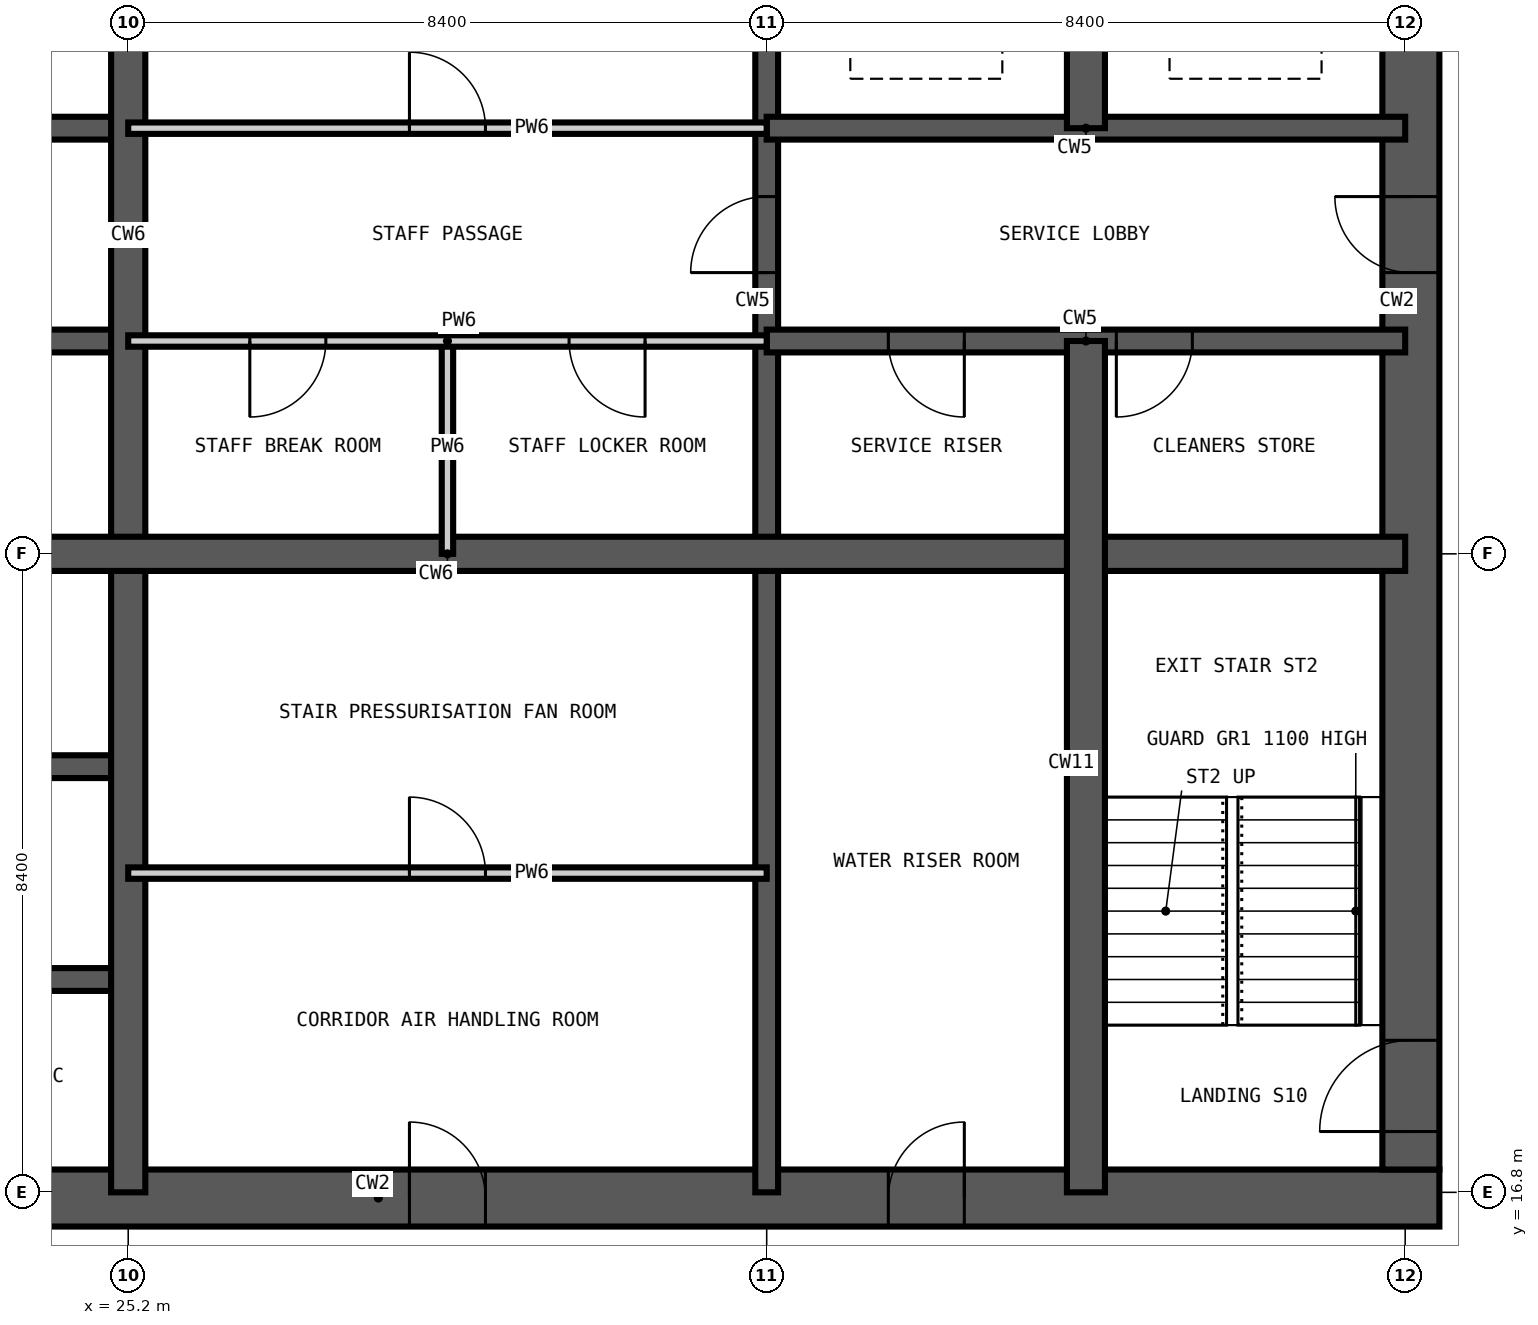
"""IFC4 building model, lengths in metres.
Left out: names, types, materials, properties, quantities, classifications, styles, units other than length and angle.
Written with IfcOpenShell. Run it as: python <this file> out.ifc"""

import sys

from ifc_helpers import new_model, si_unit, direction, frame, frame_2d, origin, place, context, subcontext, project, spatial, rectangle, extrude, element, fill, save


model = new_model("IFC4")
c1 = context("Model", 3, precision=1e-05, world=origin(), true_north=direction((0.0, 1.0)))
c2 = subcontext(c1, "Body", "Model", "MODEL_VIEW")
j1 = project(units=[si_unit("LENGTHUNIT", "METRE"), si_unit("PLANEANGLEUNIT", "RADIAN")], contexts=[c1])
p1 = place(None, origin())
s1 = spatial("IfcSite", under=j1, at=p1, CompositionType="ELEMENT")
p2 = place(p1, origin())
s2 = spatial("IfcBuilding", under=s1, at=p2, CompositionType="ELEMENT")
p3 = place(p2, frame((0.0, 0.0, 177.0)))
s3 = spatial("IfcBuildingStorey", under=s2, at=p3, CompositionType="ELEMENT", Elevation=177.0)
p4 = place(p3, frame((16.35, 16.725, -0.35), z_axis=(0.0, 0.0, 1.0), x_axis=(1.0, 0.0, 0.0)))
e1 = element("IfcWall", 1, at=p4, inside=s3, PredefinedType="SHEAR", context=c2, shape_type="SweptSolid", body=[
    extrude(rectangle(XDim=26.1, YDim=0.75, at=frame_2d((13.05, 0.0))), origin(), (0.0, 0.0, 1.0), 3.6),
])
p5 = place(p4, frame((12.55, 0.0, 0.35)))
e2 = element("IfcOpeningElement", 2, at=p5, cuts=e1, PredefinedType="OPENING", context=c2, shape_type="SweptSolid", body=[
    extrude(rectangle(XDim=1.0, YDim=2.1, at=frame_2d((0.5, 1.05))), frame((0.0, 0.385, 0.0), z_axis=(0.0, -1.0, 0.0), x_axis=(1.0, 0.0, 0.0)), (0.0, 0.0, 1.0), 0.77),
])
p6 = place(p4, frame((18.85, 0.0, 0.35)))
e3 = element("IfcOpeningElement", 3, at=p6, cuts=e1, PredefinedType="OPENING", context=c2, shape_type="SweptSolid", body=[
    extrude(rectangle(XDim=1.0, YDim=2.1, at=frame_2d((0.5, 1.05))), frame((0.0, 0.385, 0.0), z_axis=(0.0, -1.0, 0.0), x_axis=(1.0, 0.0, 0.0)), (0.0, 0.0, 1.0), 0.77),
])
p7 = place(p3, frame((42.075, 17.1, -0.35), z_axis=(0.0, 0.0, 1.0), x_axis=(0.0, 1.0, 0.0)))
e4 = element("IfcWall", 4, at=p7, inside=s3, PredefinedType="SHEAR", context=c2, shape_type="SweptSolid", body=[
    extrude(rectangle(XDim=24.6, YDim=0.75, at=frame_2d((12.3, 0.0))), origin(), (0.0, 0.0, 1.0), 3.6),
])
p8 = place(p7, frame((0.5, 0.0, 0.35)))
e5 = element("IfcOpeningElement", 5, at=p8, cuts=e4, PredefinedType="OPENING", context=c2, shape_type="SweptSolid", body=[
    extrude(rectangle(XDim=1.2, YDim=2.2, at=frame_2d((0.6, 1.1))), frame((0.0, 0.385, 0.0), z_axis=(0.0, -1.0, 0.0), x_axis=(1.0, 0.0, 0.0)), (0.0, 0.0, 1.0), 0.77),
])
p9 = place(p7, frame((11.8, 0.0, 0.35)))
e6 = element("IfcOpeningElement", 6, at=p9, cuts=e4, PredefinedType="OPENING", context=c2, shape_type="SweptSolid", body=[
    extrude(rectangle(XDim=1.0, YDim=2.1, at=frame_2d((0.5, 1.05))), frame((0.0, 0.385, 0.0), z_axis=(0.0, -1.0, 0.0), x_axis=(1.0, 0.0, 0.0)), (0.0, 0.0, 1.0), 0.77),
])
p10 = place(p7, frame((20.2, 0.0, 0.35)))
e7 = element("IfcOpeningElement", 7, at=p10, cuts=e4, PredefinedType="OPENING", context=c2, shape_type="SweptSolid", body=[
    extrude(rectangle(XDim=1.0, YDim=2.1, at=frame_2d((0.5, 1.05))), frame((0.0, 0.385, 0.0), z_axis=(0.0, -1.0, 0.0), x_axis=(1.0, 0.0, 0.0)), (0.0, 0.0, 1.0), 0.77),
])
p11 = place(p3, frame((33.6, 16.8, -0.35), z_axis=(0.0, 0.0, 1.0), x_axis=(0.0, 1.0, 0.0)))
e8 = element("IfcWall", 8, at=p11, inside=s3, PredefinedType="SHEAR", context=c2, shape_type="SweptSolid", body=[
    extrude(rectangle(XDim=25.2, YDim=0.3, at=frame_2d((12.6, 0.0))), origin(), (0.0, 0.0, 1.0), 3.6),
])
p12 = place(p11, frame((22.5, 0.0, 0.35)))
e9 = element("IfcOpeningElement", 9, at=p12, cuts=e8, PredefinedType="OPENING", context=c2, shape_type="SweptSolid", body=[
    extrude(rectangle(XDim=1.2, YDim=2.2, at=frame_2d((0.6, 1.1))), frame((0.0, 0.16, 0.0), z_axis=(0.0, -1.0, 0.0), x_axis=(1.0, 0.0, 0.0)), (0.0, 0.0, 1.0), 0.32),
])
p13 = place(p11, frame((18.3, 0.0, 0.35)))
e10 = element("IfcOpeningElement", 10, at=p13, cuts=e8, PredefinedType="OPENING", context=c2, shape_type="SweptSolid", body=[
    extrude(rectangle(XDim=1.2, YDim=2.2, at=frame_2d((0.6, 1.1))), frame((0.0, 0.16, 0.0), z_axis=(0.0, -1.0, 0.0), x_axis=(1.0, 0.0, 0.0)), (0.0, 0.0, 1.0), 0.32),
])
p14 = place(p11, frame((12.1, 0.0, 0.35)))
e11 = element("IfcOpeningElement", 11, at=p14, cuts=e8, PredefinedType="OPENING", context=c2, shape_type="SweptSolid", body=[
    extrude(rectangle(XDim=1.0, YDim=2.1, at=frame_2d((0.5, 1.05))), frame((0.0, 0.16, 0.0), z_axis=(0.0, -1.0, 0.0), x_axis=(1.0, 0.0, 0.0)), (0.0, 0.0, 1.0), 0.32),
])
p15 = place(p3, frame((16.8, 19.6, -0.35), z_axis=(0.0, 0.0, 1.0), x_axis=(1.0, 0.0, 0.0)))
e12 = element("IfcWall", 12, at=p15, inside=s3, PredefinedType="SHEAR", context=c2, shape_type="SweptSolid", body=[
    extrude(rectangle(XDim=8.4, YDim=0.3, at=frame_2d((4.2, 0.0))), origin(), (0.0, 0.0, 1.0), 3.6),
])
p16 = place(p15, frame((1.6, 0.0, 0.35)))
e13 = element("IfcOpeningElement", 13, at=p16, cuts=e12, PredefinedType="OPENING", context=c2, shape_type="SweptSolid", body=[
    extrude(rectangle(XDim=1.0, YDim=2.1, at=frame_2d((0.5, 1.05))), frame((0.0, 0.16, 0.0), z_axis=(0.0, -1.0, 0.0), x_axis=(1.0, 0.0, 0.0)), (0.0, 0.0, 1.0), 0.32),
])
p17 = place(p15, frame((5.8, 0.0, 0.35)))
e14 = element("IfcOpeningElement", 14, at=p17, cuts=e12, PredefinedType="OPENING", context=c2, shape_type="SweptSolid", body=[
    extrude(rectangle(XDim=1.0, YDim=2.1, at=frame_2d((0.5, 1.05))), frame((0.0, 0.16, 0.0), z_axis=(0.0, -1.0, 0.0), x_axis=(1.0, 0.0, 0.0)), (0.0, 0.0, 1.0), 0.32),
])
p18 = place(p3, frame((16.8, 22.4, -0.35), z_axis=(0.0, 0.0, 1.0), x_axis=(1.0, 0.0, 0.0)))
e15 = element("IfcWall", 15, at=p18, inside=s3, PredefinedType="SHEAR", context=c2, shape_type="SweptSolid", body=[
    extrude(rectangle(XDim=8.4, YDim=0.3, at=frame_2d((4.2, 0.0))), origin(), (0.0, 0.0, 1.0), 3.6),
])
p19 = place(p18, frame((1.6, 0.0, 0.35)))
e16 = element("IfcOpeningElement", 16, at=p19, cuts=e15, PredefinedType="OPENING", context=c2, shape_type="SweptSolid", body=[
    extrude(rectangle(XDim=1.0, YDim=2.1, at=frame_2d((0.5, 1.05))), frame((0.0, 0.16, 0.0), z_axis=(0.0, -1.0, 0.0), x_axis=(1.0, 0.0, 0.0)), (0.0, 0.0, 1.0), 0.32),
])
p20 = place(p18, frame((5.8, 0.0, 0.35)))
e17 = element("IfcOpeningElement", 17, at=p20, cuts=e15, PredefinedType="OPENING", context=c2, shape_type="SweptSolid", body=[
    extrude(rectangle(XDim=1.0, YDim=2.1, at=frame_2d((0.5, 1.05))), frame((0.0, 0.16, 0.0), z_axis=(0.0, -1.0, 0.0), x_axis=(1.0, 0.0, 0.0)), (0.0, 0.0, 1.0), 0.32),
])
p21 = place(p3, frame((16.8, 28.0, -0.35), z_axis=(0.0, 0.0, 1.0), x_axis=(1.0, 0.0, 0.0)))
e18 = element("IfcWall", 18, at=p21, inside=s3, PredefinedType="SHEAR", context=c2, shape_type="SweptSolid", body=[
    extrude(rectangle(XDim=8.4, YDim=0.3, at=frame_2d((4.2, 0.0))), origin(), (0.0, 0.0, 1.0), 3.6),
])
p22 = place(p21, frame((1.55, 0.0, 0.35)))
e19 = element("IfcOpeningElement", 19, at=p22, cuts=e18, PredefinedType="OPENING", context=c2, shape_type="SweptSolid", body=[
    extrude(rectangle(XDim=1.1, YDim=2.2, at=frame_2d((0.55, 1.1))), frame((0.0, 0.16, 0.0), z_axis=(0.0, -1.0, 0.0), x_axis=(1.0, 0.0, 0.0)), (0.0, 0.0, 1.0), 0.32),
])
p23 = place(p21, frame((5.75, 0.0, 0.35)))
e20 = element("IfcOpeningElement", 20, at=p23, cuts=e18, PredefinedType="OPENING", context=c2, shape_type="SweptSolid", body=[
    extrude(rectangle(XDim=1.1, YDim=2.2, at=frame_2d((0.55, 1.1))), frame((0.0, 0.16, 0.0), z_axis=(0.0, -1.0, 0.0), x_axis=(1.0, 0.0, 0.0)), (0.0, 0.0, 1.0), 0.32),
])
p24 = place(p3, frame((33.6, 28.0, -0.35), z_axis=(0.0, 0.0, 1.0), x_axis=(1.0, 0.0, 0.0)))
e21 = element("IfcWall", 21, at=p24, inside=s3, PredefinedType="SHEAR", context=c2, shape_type="SweptSolid", body=[
    extrude(rectangle(XDim=8.4, YDim=0.3, at=frame_2d((4.2, 0.0))), origin(), (0.0, 0.0, 1.0), 3.6),
])
p25 = place(p24, frame((1.6, 0.0, 0.35)))
e22 = element("IfcOpeningElement", 22, at=p25, cuts=e21, PredefinedType="OPENING", context=c2, shape_type="SweptSolid", body=[
    extrude(rectangle(XDim=1.0, YDim=2.1, at=frame_2d((0.5, 1.05))), frame((0.0, 0.16, 0.0), z_axis=(0.0, -1.0, 0.0), x_axis=(1.0, 0.0, 0.0)), (0.0, 0.0, 1.0), 0.32),
])
p26 = place(p24, frame((4.6, 0.0, 0.35)))
e23 = element("IfcOpeningElement", 23, at=p26, cuts=e21, PredefinedType="OPENING", context=c2, shape_type="SweptSolid", body=[
    extrude(rectangle(XDim=1.0, YDim=2.1, at=frame_2d((0.5, 1.05))), frame((0.0, 0.16, 0.0), z_axis=(0.0, -1.0, 0.0), x_axis=(1.0, 0.0, 0.0)), (0.0, 0.0, 1.0), 0.32),
])
p27 = place(p3, frame((16.8, 30.8, -0.35), z_axis=(0.0, 0.0, 1.0), x_axis=(1.0, 0.0, 0.0)))
e24 = element("IfcWall", 24, at=p27, inside=s3, PredefinedType="SHEAR", context=c2, shape_type="SweptSolid", body=[
    extrude(rectangle(XDim=8.4, YDim=0.3, at=frame_2d((4.2, 0.0))), origin(), (0.0, 0.0, 1.0), 3.6),
])
p28 = place(p27, frame((1.55, 0.0, 0.35)))
e25 = element("IfcOpeningElement", 25, at=p28, cuts=e24, PredefinedType="OPENING", context=c2, shape_type="SweptSolid", body=[
    extrude(rectangle(XDim=1.1, YDim=2.2, at=frame_2d((0.55, 1.1))), frame((0.0, 0.16, 0.0), z_axis=(0.0, -1.0, 0.0), x_axis=(1.0, 0.0, 0.0)), (0.0, 0.0, 1.0), 0.32),
])
p29 = place(p27, frame((5.75, 0.0, 0.35)))
e26 = element("IfcOpeningElement", 26, at=p29, cuts=e24, PredefinedType="OPENING", context=c2, shape_type="SweptSolid", body=[
    extrude(rectangle(XDim=1.1, YDim=2.2, at=frame_2d((0.55, 1.1))), frame((0.0, 0.16, 0.0), z_axis=(0.0, -1.0, 0.0), x_axis=(1.0, 0.0, 0.0)), (0.0, 0.0, 1.0), 0.32),
])
p30 = place(p3, frame((33.6, 30.8, -0.35), z_axis=(0.0, 0.0, 1.0), x_axis=(1.0, 0.0, 0.0)))
e27 = element("IfcWall", 27, at=p30, inside=s3, PredefinedType="SHEAR", context=c2, shape_type="SweptSolid", body=[
    extrude(rectangle(XDim=8.4, YDim=0.3, at=frame_2d((4.2, 0.0))), origin(), (0.0, 0.0, 1.0), 3.6),
])
for number, where, z_axis, x_axis in (
    (28, (25.2, 16.8, -0.35), (0.0, 0.0, 1.0), (0.0, 1.0, 0.0)),
    (29, (16.8, 25.2, -0.35), (0.0, 0.0, 1.0), (1.0, 0.0, 0.0)),
):
    element("IfcWall", number, at=place(p3, frame(where, z_axis=z_axis, x_axis=x_axis)), inside=s3, PredefinedType="SHEAR", context=c2, shape_type="SweptSolid", body=[
        extrude(rectangle(XDim=25.2, YDim=0.45, at=frame_2d((12.6, 0.0))), origin(), (0.0, 0.0, 1.0), 3.6),
    ])
p31 = place(p3, frame((37.8, 16.8, -0.35), z_axis=(0.0, 0.0, 1.0), x_axis=(0.0, 1.0, 0.0)))
e30 = element("IfcWall", 30, at=p31, inside=s3, PredefinedType="SHEAR", context=c2, shape_type="SweptSolid", body=[
    extrude(rectangle(XDim=11.2, YDim=0.5, at=frame_2d((5.6, 0.0))), origin(), (0.0, 0.0, 1.0), 3.6),
])
p32 = place(p3, frame((37.8, 30.8, -0.35), z_axis=(0.0, 0.0, 1.0), x_axis=(0.0, 1.0, 0.0)))
e31 = element("IfcWall", 31, at=p32, inside=s3, PredefinedType="SHEAR", context=c2, shape_type="SweptSolid", body=[
    extrude(rectangle(XDim=2.8, YDim=0.5, at=frame_2d((1.4, 0.0))), origin(), (0.0, 0.0, 1.0), 3.6),
])
p33 = place(p3, frame((29.4, 25.2, 0.0), z_axis=(0.0, 0.0, 1.0), x_axis=(0.0, 1.0, 0.0)))
e32 = element("IfcWall", 32, at=p33, inside=s3, PredefinedType="PARTITIONING", context=c2, shape_type="SweptSolid", body=[
    extrude(rectangle(XDim=2.8, YDim=0.15, at=frame_2d((1.4, 0.0))), origin(), (0.0, 0.0, 1.0), 3.25),
])
p34 = place(p3, frame((25.2, 21.0, 0.0), z_axis=(0.0, 0.0, 1.0), x_axis=(1.0, 0.0, 0.0)))
e33 = element("IfcWall", 33, at=p34, inside=s3, PredefinedType="PARTITIONING", context=c2, shape_type="SweptSolid", body=[
    extrude(rectangle(XDim=8.4, YDim=0.15, at=frame_2d((4.2, 0.0))), origin(), (0.0, 0.0, 1.0), 3.25),
])
p35 = place(p34, frame((3.7, 0.0, 0.0)))
e34 = element("IfcOpeningElement", 34, at=p35, cuts=e33, PredefinedType="OPENING", context=c2, shape_type="SweptSolid", body=[
    extrude(rectangle(XDim=1.0, YDim=2.1, at=frame_2d((0.5, 1.05))), frame((0.0, 0.085, 0.0), z_axis=(0.0, -1.0, 0.0), x_axis=(1.0, 0.0, 0.0)), (0.0, 0.0, 1.0), 0.17),
])
p36 = place(p3, frame((25.2, 28.0, 0.0), z_axis=(0.0, 0.0, 1.0), x_axis=(1.0, 0.0, 0.0)))
e35 = element("IfcWall", 35, at=p36, inside=s3, PredefinedType="PARTITIONING", context=c2, shape_type="SweptSolid", body=[
    extrude(rectangle(XDim=8.4, YDim=0.15, at=frame_2d((4.2, 0.0))), origin(), (0.0, 0.0, 1.0), 3.25),
])
p37 = place(p36, frame((5.8, 0.0, 0.0)))
e36 = element("IfcOpeningElement", 36, at=p37, cuts=e35, PredefinedType="OPENING", context=c2, shape_type="SweptSolid", body=[
    extrude(rectangle(XDim=1.0, YDim=2.1, at=frame_2d((0.5, 1.05))), frame((0.0, 0.085, 0.0), z_axis=(0.0, -1.0, 0.0), x_axis=(1.0, 0.0, 0.0)), (0.0, 0.0, 1.0), 0.17),
])
p38 = place(p36, frame((1.6, 0.0, 0.0)))
e37 = element("IfcOpeningElement", 37, at=p38, cuts=e35, PredefinedType="OPENING", context=c2, shape_type="SweptSolid", body=[
    extrude(rectangle(XDim=1.0, YDim=2.1, at=frame_2d((0.5, 1.05))), frame((0.0, 0.085, 0.0), z_axis=(0.0, -1.0, 0.0), x_axis=(1.0, 0.0, 0.0)), (0.0, 0.0, 1.0), 0.17),
])
p39 = place(p3, frame((25.2, 30.8, 0.0), z_axis=(0.0, 0.0, 1.0), x_axis=(1.0, 0.0, 0.0)))
e38 = element("IfcWall", 38, at=p39, inside=s3, PredefinedType="PARTITIONING", context=c2, shape_type="SweptSolid", body=[
    extrude(rectangle(XDim=8.4, YDim=0.15, at=frame_2d((4.2, 0.0))), origin(), (0.0, 0.0, 1.0), 3.25),
])
p40 = place(p39, frame((3.7, 0.0, 0.0)))
e39 = element("IfcOpeningElement", 39, at=p40, cuts=e38, PredefinedType="OPENING", context=c2, shape_type="SweptSolid", body=[
    extrude(rectangle(XDim=1.0, YDim=2.1, at=frame_2d((0.5, 1.05))), frame((0.0, 0.085, 0.0), z_axis=(0.0, -1.0, 0.0), x_axis=(1.0, 0.0, 0.0)), (0.0, 0.0, 1.0), 0.17),
])
p41 = place(p8, origin())
e40 = element("IfcDoor", 40, at=p41, inside=s3, OperationType="SINGLE_SWING_LEFT", PredefinedType="DOOR", context=c2, shape_type="SweptSolid", body=[
    extrude(rectangle(XDim=1.2, YDim=2.2, at=frame_2d((0.6, 1.1))), frame((0.0, 0.025, 0.0), z_axis=(0.0, -1.0, 0.0), x_axis=(1.0, 0.0, 0.0)), (0.0, 0.0, 1.0), 0.05),
])
fill(e5, e40)
p42 = place(p14, origin())
e41 = element("IfcDoor", 41, at=p42, inside=s3, OperationType="SINGLE_SWING_LEFT", PredefinedType="DOOR", context=c2, shape_type="SweptSolid", body=[
    extrude(rectangle(XDim=1.0, YDim=2.1, at=frame_2d((0.5, 1.05))), frame((0.0, 0.025, 0.0), z_axis=(0.0, -1.0, 0.0), x_axis=(1.0, 0.0, 0.0)), (0.0, 0.0, 1.0), 0.05),
])
fill(e11, e41)
p43 = place(p37, frame((1.0, 0.0, 0.0), z_axis=(0.0, 0.0, 1.0), x_axis=(-1.0, 0.0, 0.0)))
e42 = element("IfcDoor", 42, at=p43, inside=s3, OperationType="SINGLE_SWING_LEFT", PredefinedType="DOOR", context=c2, shape_type="SweptSolid", body=[
    extrude(rectangle(XDim=1.0, YDim=2.1, at=frame_2d((0.5, 1.05))), frame((0.0, 0.025, 0.0), z_axis=(0.0, -1.0, 0.0), x_axis=(1.0, 0.0, 0.0)), (0.0, 0.0, 1.0), 0.05),
])
fill(e36, e42)
p44 = place(p38, frame((1.0, 0.0, 0.0), z_axis=(0.0, 0.0, 1.0), x_axis=(-1.0, 0.0, 0.0)))
e43 = element("IfcDoor", 43, at=p44, inside=s3, OperationType="SINGLE_SWING_RIGHT", PredefinedType="DOOR", context=c2, shape_type="SweptSolid", body=[
    extrude(rectangle(XDim=1.0, YDim=2.1, at=frame_2d((0.5, 1.05))), frame((0.0, 0.025, 0.0), z_axis=(0.0, -1.0, 0.0), x_axis=(1.0, 0.0, 0.0)), (0.0, 0.0, 1.0), 0.05),
])
fill(e37, e43)
p45 = place(p40, origin())
e44 = element("IfcDoor", 44, at=p45, inside=s3, OperationType="SINGLE_SWING_LEFT", PredefinedType="DOOR", context=c2, shape_type="SweptSolid", body=[
    extrude(rectangle(XDim=1.0, YDim=2.1, at=frame_2d((0.5, 1.05))), frame((0.0, 0.025, 0.0), z_axis=(0.0, -1.0, 0.0), x_axis=(1.0, 0.0, 0.0)), (0.0, 0.0, 1.0), 0.05),
])
fill(e39, e44)
p46 = place(p25, frame((1.0, 0.0, 0.0), z_axis=(0.0, 0.0, 1.0), x_axis=(-1.0, 0.0, 0.0)))
e45 = element("IfcDoor", 45, at=p46, inside=s3, OperationType="SINGLE_SWING_LEFT", PredefinedType="DOOR", context=c2, shape_type="SweptSolid", body=[
    extrude(rectangle(XDim=1.0, YDim=2.1, at=frame_2d((0.5, 1.05))), frame((0.0, 0.025, 0.0), z_axis=(0.0, -1.0, 0.0), x_axis=(1.0, 0.0, 0.0)), (0.0, 0.0, 1.0), 0.05),
])
fill(e22, e45)
p47 = place(p26, frame((1.0, 0.0, 0.0), z_axis=(0.0, 0.0, 1.0), x_axis=(-1.0, 0.0, 0.0)))
e46 = element("IfcDoor", 46, at=p47, inside=s3, OperationType="SINGLE_SWING_RIGHT", PredefinedType="DOOR", context=c2, shape_type="SweptSolid", body=[
    extrude(rectangle(XDim=1.0, YDim=2.1, at=frame_2d((0.5, 1.05))), frame((0.0, 0.025, 0.0), z_axis=(0.0, -1.0, 0.0), x_axis=(1.0, 0.0, 0.0)), (0.0, 0.0, 1.0), 0.05),
])
fill(e23, e46)
p48 = place(p9, origin())
e47 = element("IfcDoor", 47, at=p48, inside=s3, OperationType="SINGLE_SWING_RIGHT", PredefinedType="DOOR", context=c2, shape_type="SweptSolid", body=[
    extrude(rectangle(XDim=1.0, YDim=2.1, at=frame_2d((0.5, 1.05))), frame((0.0, 0.025, 0.0), z_axis=(0.0, -1.0, 0.0), x_axis=(1.0, 0.0, 0.0)), (0.0, 0.0, 1.0), 0.05),
])
fill(e6, e47)
p49 = place(p5, origin())
e48 = element("IfcDoor", 48, at=p49, inside=s3, OperationType="SINGLE_SWING_LEFT", PredefinedType="DOOR", context=c2, shape_type="SweptSolid", body=[
    extrude(rectangle(XDim=1.0, YDim=2.1, at=frame_2d((0.5, 1.05))), frame((0.0, 0.025, 0.0), z_axis=(0.0, -1.0, 0.0), x_axis=(1.0, 0.0, 0.0)), (0.0, 0.0, 1.0), 0.05),
])
fill(e2, e48)
p50 = place(p35, origin())
e49 = element("IfcDoor", 49, at=p50, inside=s3, OperationType="SINGLE_SWING_LEFT", PredefinedType="DOOR", context=c2, shape_type="SweptSolid", body=[
    extrude(rectangle(XDim=1.0, YDim=2.1, at=frame_2d((0.5, 1.05))), frame((0.0, 0.025, 0.0), z_axis=(0.0, -1.0, 0.0), x_axis=(1.0, 0.0, 0.0)), (0.0, 0.0, 1.0), 0.05),
])
fill(e34, e49)
p51 = place(p6, origin())
e50 = element("IfcDoor", 50, at=p51, inside=s3, OperationType="SINGLE_SWING_RIGHT", PredefinedType="DOOR", context=c2, shape_type="SweptSolid", body=[
    extrude(rectangle(XDim=1.0, YDim=2.1, at=frame_2d((0.5, 1.05))), frame((0.0, 0.025, 0.0), z_axis=(0.0, -1.0, 0.0), x_axis=(1.0, 0.0, 0.0)), (0.0, 0.0, 1.0), 0.05),
])
fill(e3, e50)
save(model, sys.argv[1])
